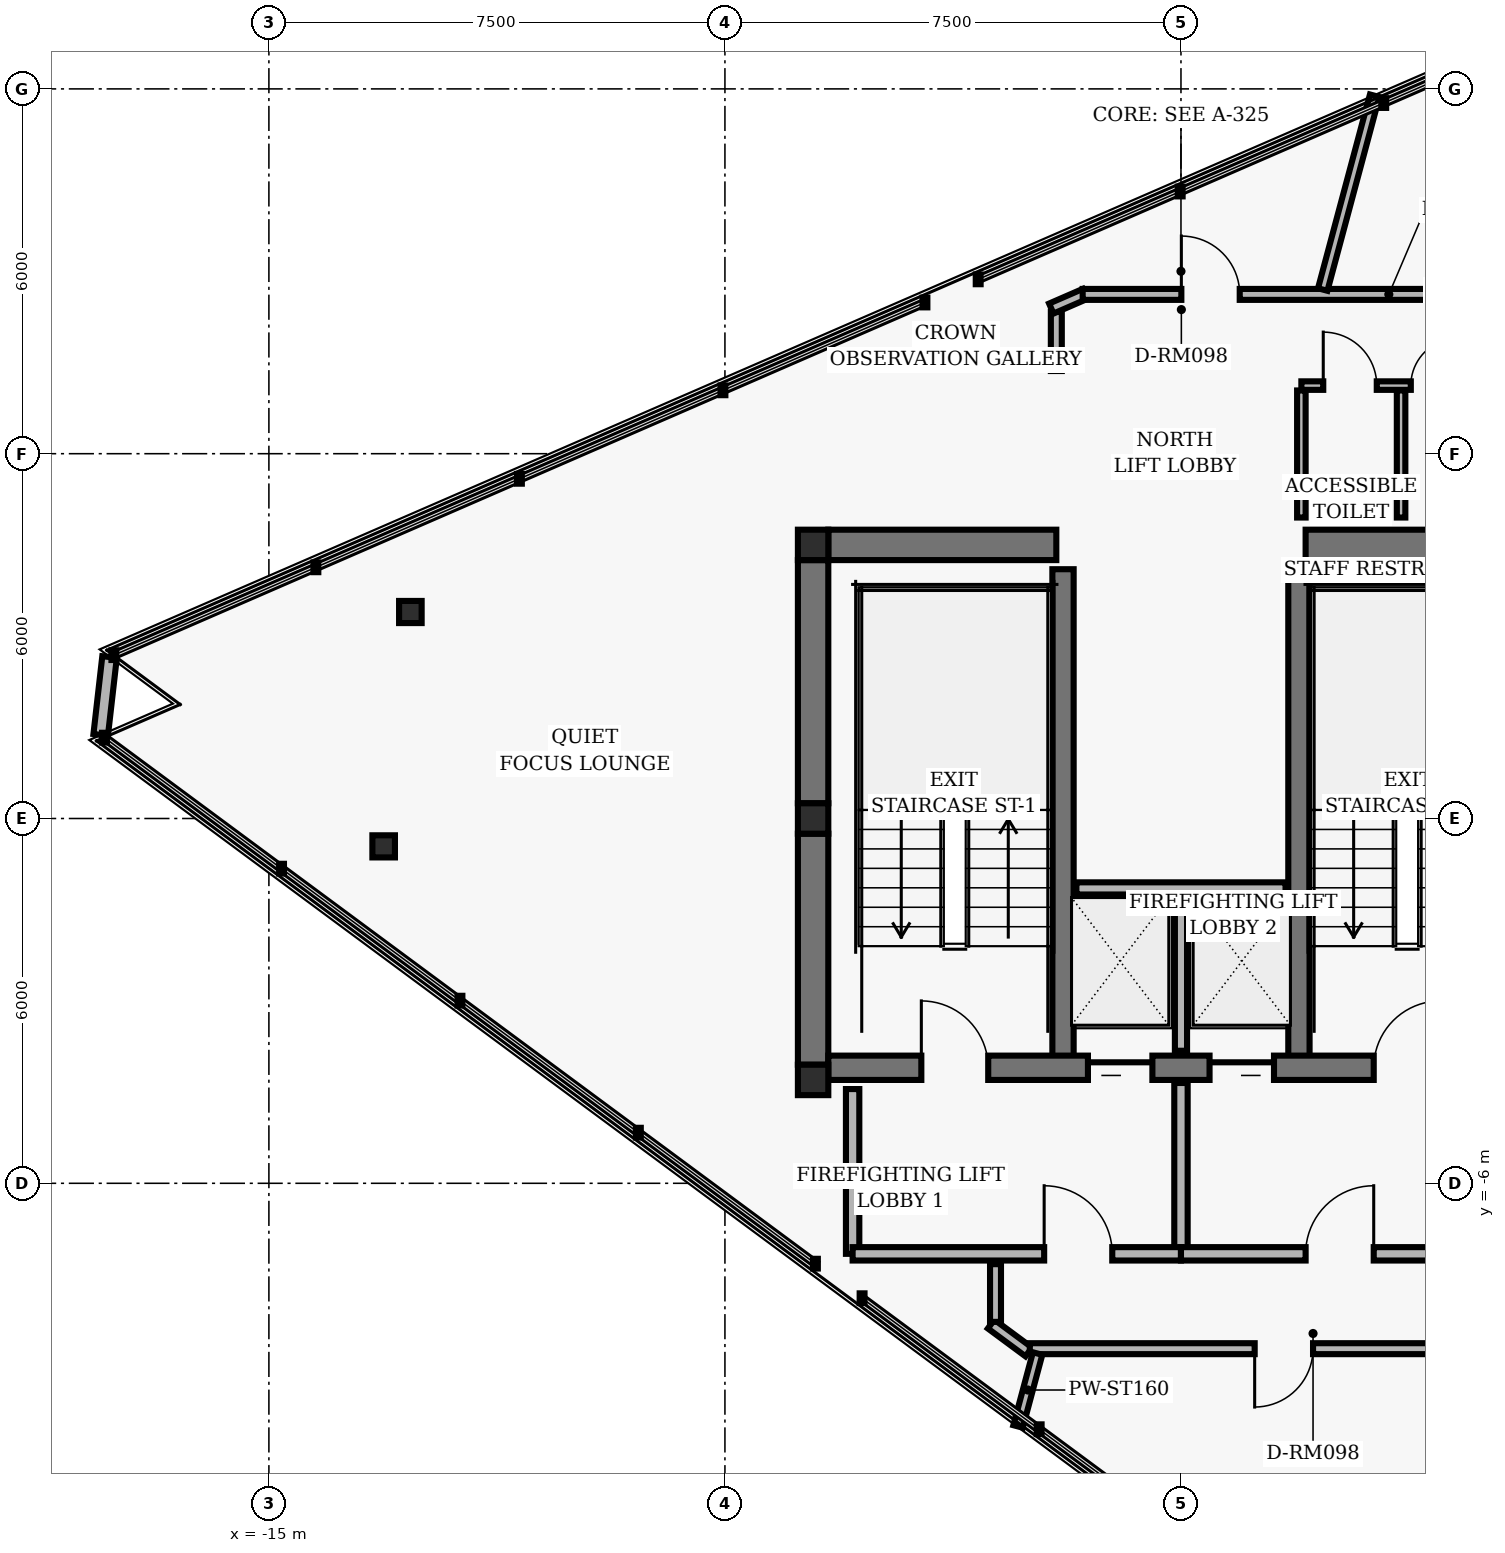
"""IFC4 building model, lengths in metres.
Left out: names, types, materials, properties, quantities, classifications, styles, units other than length and angle.
Written with IfcOpenShell. Run it as: python <this file> out.ifc"""

import sys

from ifc_helpers import new_model, si_unit, direction, frame, frame_2d, origin, origin_2d, place, context, subcontext, project, spatial, rectangle, hollow_rectangle, i_section, extrude, element, fill, save


model = new_model("IFC4")
c1 = context("Model", 3, precision=1e-05, world=origin(), true_north=direction((0.0, 1.0)))
c2 = subcontext(c1, "Body", "Model", "MODEL_VIEW")
j1 = project(units=[si_unit("LENGTHUNIT", "METRE"), si_unit("PLANEANGLEUNIT", "RADIAN")], contexts=[c1])
p1 = place(None, origin())
s1 = spatial("IfcSite", under=j1, at=p1, CompositionType="ELEMENT")
p2 = place(p1, origin())
s2 = spatial("IfcBuilding", under=s1, at=p2, CompositionType="ELEMENT")
p3 = place(p2, frame((0.0, 0.0, 243.36)))
s3 = spatial("IfcBuildingStorey", under=s2, at=p3, CompositionType="ELEMENT", Elevation=243.36)
for number, where, z_axis, x_axis in (
    (1, (-6.05, 4.5, 0.0), (0.0, 0.0, 1.0), (1.0, 0.0, 0.0)),
    (2, (-6.05, 0.0, 0.0), (0.0, 0.0, 1.0), (1.0, 0.0, 0.0)),
    (3, (-6.05, -4.3, 0.0), (0.0, 0.0, 1.0), (1.0, 0.0, 0.0)),
):
    element("IfcColumn", number, at=place(p3, frame(where, z_axis=z_axis, x_axis=x_axis)), inside=s3, PredefinedType="COLUMN", context=c2, shape_type="SweptSolid", body=[
        extrude(hollow_rectangle(XDim=0.5, YDim=0.5, WallThickness=0.02, InnerFilletRadius=0.02, OuterFilletRadius=0.04, at=origin_2d()), origin(), (0.0, 0.0, 1.0), 2.88),
    ])
p4 = place(p3, frame((-6.05, 0.25, 0.0), z_axis=(0.0, 0.0, 1.0), x_axis=(0.0, 1.0, 0.0)))
e4 = element("IfcWall", 4, at=p4, inside=s3, PredefinedType="SHEAR", context=c2, shape_type="SweptSolid", body=[
    extrude(rectangle(XDim=4.0, YDim=0.5, at=frame_2d((2.0, 0.0))), origin(), (0.0, 0.0, 1.0), 2.648),
])
p5 = place(p3, frame((-6.05, -4.05, 0.0), z_axis=(0.0, 0.0, 1.0), x_axis=(0.0, 1.0, 0.0)))
e5 = element("IfcWall", 5, at=p5, inside=s3, PredefinedType="SHEAR", context=c2, shape_type="SweptSolid", body=[
    extrude(rectangle(XDim=3.8, YDim=0.5, at=frame_2d((1.9, 0.0))), origin(), (0.0, 0.0, 1.0), 2.648),
])
for number, where, z_axis, x_axis in (
    (6, (-1.94, -4.1, 0.0), (0.0, 0.0, 1.0), (0.0, 1.0, 0.0)),
    (7, (1.94, -4.1, 0.0), (0.0, 0.0, 1.0), (0.0, 1.0, 0.0)),
):
    element("IfcWall", number, at=place(p3, frame(where, z_axis=z_axis, x_axis=x_axis)), inside=s3, PredefinedType="SHEAR", context=c2, shape_type="SweptSolid", body=[
        extrude(rectangle(XDim=8.2, YDim=0.35, at=frame_2d((4.1, 0.0))), origin(), (0.0, 0.0, 1.0), 2.648),
    ])
p6 = place(p3, frame((-5.8, -4.1, 0.0), z_axis=(0.0, 0.0, 1.0), x_axis=(1.0, 0.0, 0.0)))
e8 = element("IfcWall", 8, at=p6, inside=s3, PredefinedType="SHEAR", context=c2, shape_type="SweptSolid", body=[
    extrude(rectangle(XDim=11.6, YDim=0.4, at=frame_2d((5.8, 0.0))), origin(), (0.0, 0.0, 1.0), 2.648),
])
p7 = place(p6, frame((1.53, 0.0, 0.0)))
e9 = element("IfcOpeningElement", 9, at=p7, cuts=e8, PredefinedType="OPENING", context=c2, shape_type="SweptSolid", body=[
    extrude(rectangle(XDim=1.1, YDim=2.04, at=frame_2d((0.55, 1.02))), frame((0.0, 0.21, 0.0), z_axis=(0.0, -1.0, 0.0), x_axis=(1.0, 0.0, 0.0)), (0.0, 0.0, 1.0), 0.42),
])
p8 = place(p6, frame((8.97, 0.0, 0.0)))
e10 = element("IfcOpeningElement", 10, at=p8, cuts=e8, PredefinedType="OPENING", context=c2, shape_type="SweptSolid", body=[
    extrude(rectangle(XDim=1.1, YDim=2.04, at=frame_2d((0.55, 1.02))), frame((0.0, 0.21, 0.0), z_axis=(0.0, -1.0, 0.0), x_axis=(1.0, 0.0, 0.0)), (0.0, 0.0, 1.0), 0.42),
])
p9 = place(p6, frame((4.27, 0.0, 0.0)))
e11 = element("IfcOpeningElement", 11, at=p9, cuts=e8, PredefinedType="OPENING", context=c2, shape_type="SweptSolid", body=[
    extrude(rectangle(XDim=1.06, YDim=2.04, at=frame_2d((0.53, 1.02))), frame((0.0, 0.21, 0.0), z_axis=(0.0, -1.0, 0.0), x_axis=(1.0, 0.0, 0.0)), (0.0, 0.0, 1.0), 0.42),
])
p10 = place(p6, frame((6.27, 0.0, 0.0)))
e12 = element("IfcOpeningElement", 12, at=p10, cuts=e8, PredefinedType="OPENING", context=c2, shape_type="SweptSolid", body=[
    extrude(rectangle(XDim=1.06, YDim=2.04, at=frame_2d((0.53, 1.02))), frame((0.0, 0.21, 0.0), z_axis=(0.0, -1.0, 0.0), x_axis=(1.0, 0.0, 0.0)), (0.0, 0.0, 1.0), 0.42),
])
for number, where, z_axis, x_axis in (
    (13, (-5.8, 4.5, 0.0), (0.0, 0.0, 1.0), (1.0, 0.0, 0.0)),
    (14, (2.05, 4.5, 0.0), (0.0, 0.0, 1.0), (1.0, 0.0, 0.0)),
):
    element("IfcWall", number, at=place(p3, frame(where, z_axis=z_axis, x_axis=x_axis)), inside=s3, PredefinedType="SHEAR", context=c2, shape_type="SweptSolid", body=[
        extrude(rectangle(XDim=3.75, YDim=0.5, at=frame_2d((1.875, 0.0))), origin(), (0.0, 0.0, 1.0), 2.648),
    ])
for number, where, z_axis, x_axis in (
    (15, (-12.673, 3.396, 0.0), (0.0, 0.0, 1.0), (1.0, 0.0, 0.0)),
    (16, (-13.113, -0.458, 0.0), (0.0, 0.0, 1.0), (1.0, 0.0, 0.0)),
):
    element("IfcColumn", number, at=place(p3, frame(where, z_axis=z_axis, x_axis=x_axis)), inside=s3, PredefinedType="COLUMN", context=c2, shape_type="SweptSolid", body=[
        extrude(i_section(OverallWidth=0.371, OverallDepth=0.364, WebThickness=0.013, FlangeThickness=0.022, FilletRadius=0.015, at=origin_2d()), origin(), (0.0, 0.0, 1.0), 2.88),
    ])
p11 = place(p3, frame((-17.621, 2.656, 0.0), z_axis=(0.0, 0.0, 1.0), x_axis=(-0.11313504355, -0.993579620323, 0.0)))
e17 = element("IfcWall", 17, at=p11, inside=s3, PredefinedType="PARAPET", context=c2, shape_type="SweptSolid", body=[
    extrude(rectangle(XDim=1.288, YDim=0.24, at=frame_2d((0.644, 0.0))), origin(), (0.0, 0.0, 1.0), 2.168),
])
p12 = place(p3, frame((0.0, -3.82, 0.0), z_axis=(0.0, 0.0, 1.0), x_axis=(0.0, 1.0, 0.0)))
e18 = element("IfcWall", 18, at=p12, inside=s3, PredefinedType="PARTITIONING", context=c2, shape_type="SweptSolid", body=[
    extrude(rectangle(XDim=2.67, YDim=0.2, at=frame_2d((1.335, 0.0))), origin(), (0.0, 0.0, 1.0), 2.623),
])
p13 = place(p3, frame((-1.72, -1.15, 0.0), z_axis=(0.0, 0.0, 1.0), x_axis=(1.0, 0.0, 0.0)))
e19 = element("IfcWall", 19, at=p13, inside=s3, PredefinedType="PARTITIONING", context=c2, shape_type="SweptSolid", body=[
    extrude(rectangle(XDim=3.44, YDim=0.2, at=frame_2d((1.72, 0.0))), origin(), (0.0, 0.0, 1.0), 2.623),
])
p14 = place(p3, frame((-5.4, -7.16, 0.0), z_axis=(0.0, 0.0, 1.0), x_axis=(0.0, 1.0, 0.0)))
e20 = element("IfcWall", 20, at=p14, inside=s3, PredefinedType="PARTITIONING", context=c2, shape_type="SweptSolid", body=[
    extrude(rectangle(XDim=2.71, YDim=0.22, at=frame_2d((1.355, 0.0))), origin(), (0.0, 0.0, 1.0), 2.623),
])
p15 = place(p3, frame((0.0, -7.16, 0.0), z_axis=(0.0, 0.0, 1.0), x_axis=(0.0, 1.0, 0.0)))
e21 = element("IfcWall", 21, at=p15, inside=s3, PredefinedType="PARTITIONING", context=c2, shape_type="SweptSolid", body=[
    extrude(rectangle(XDim=2.81, YDim=0.22, at=frame_2d((1.405, 0.0))), origin(), (0.0, 0.0, 1.0), 2.623),
])
p16 = place(p3, frame((-5.4, -7.16, 0.0), z_axis=(0.0, 0.0, 1.0), x_axis=(1.0, 0.0, 0.0)))
e22 = element("IfcWall", 22, at=p16, inside=s3, PredefinedType="PARTITIONING", context=c2, shape_type="SweptSolid", body=[
    extrude(rectangle(XDim=5.4, YDim=0.22, at=frame_2d((2.7, 0.0))), origin(), (0.0, 0.0, 1.0), 2.623),
])
p17 = place(p16, frame((3.15, 0.0, 0.0)))
e23 = element("IfcOpeningElement", 23, at=p17, cuts=e22, PredefinedType="OPENING", context=c2, shape_type="SweptSolid", body=[
    extrude(rectangle(XDim=1.12, YDim=2.02, at=frame_2d((0.56, 1.01))), frame((0.0, 0.12, 0.0), z_axis=(0.0, -1.0, 0.0), x_axis=(1.0, 0.0, 0.0)), (0.0, 0.0, 1.0), 0.24),
])
p18 = place(p3, frame((0.0, -7.16, 0.0), z_axis=(0.0, 0.0, 1.0), x_axis=(1.0, 0.0, 0.0)))
e24 = element("IfcWall", 24, at=p18, inside=s3, PredefinedType="PARTITIONING", context=c2, shape_type="SweptSolid", body=[
    extrude(rectangle(XDim=4.95, YDim=0.22, at=frame_2d((2.475, 0.0))), origin(), (0.0, 0.0, 1.0), 2.623),
])
p19 = place(p18, frame((2.05, 0.0, 0.0)))
e25 = element("IfcOpeningElement", 25, at=p19, cuts=e24, PredefinedType="OPENING", context=c2, shape_type="SweptSolid", body=[
    extrude(rectangle(XDim=1.12, YDim=2.02, at=frame_2d((0.56, 1.01))), frame((0.0, 0.12, 0.0), z_axis=(0.0, -1.0, 0.0), x_axis=(1.0, 0.0, 0.0)), (0.0, 0.0, 1.0), 0.24),
])
p20 = place(p3, frame((1.98, 4.95, 0.0), z_axis=(0.0, 0.0, 1.0), x_axis=(0.0, 1.0, 0.0)))
e26 = element("IfcWall", 26, at=p20, inside=s3, PredefinedType="PARTITIONING", context=c2, shape_type="SweptSolid", body=[
    extrude(rectangle(XDim=2.09, YDim=0.14, at=frame_2d((1.045, 0.0))), origin(), (0.0, 0.0, 1.0), 2.623),
])
p21 = place(p3, frame((1.98, 7.12, 0.0), z_axis=(0.0, 0.0, 1.0), x_axis=(1.0, 0.0, 0.0)))
e27 = element("IfcWall", 27, at=p21, inside=s3, PredefinedType="PARTITIONING", context=c2, shape_type="SweptSolid", body=[
    extrude(rectangle(XDim=3.86, YDim=0.14, at=frame_2d((1.93, 0.0))), origin(), (0.0, 0.0, 1.0), 2.623),
])
p22 = place(p21, frame((0.36, 0.0, 0.0)))
e28 = element("IfcOpeningElement", 28, at=p22, cuts=e27, PredefinedType="OPENING", context=c2, shape_type="SweptSolid", body=[
    extrude(rectangle(XDim=0.88, YDim=2.02, at=frame_2d((0.44, 1.01))), frame((0.0, 0.08, 0.0), z_axis=(0.0, -1.0, 0.0), x_axis=(1.0, 0.0, 0.0)), (0.0, 0.0, 1.0), 0.16),
])
p23 = place(p21, frame((1.8, 0.0, 0.0)))
e29 = element("IfcOpeningElement", 29, at=p23, cuts=e27, PredefinedType="OPENING", context=c2, shape_type="SweptSolid", body=[
    extrude(rectangle(XDim=0.78, YDim=2.01, at=frame_2d((0.39, 1.005))), frame((0.0, 0.08, 0.0), z_axis=(0.0, -1.0, 0.0), x_axis=(1.0, 0.0, 0.0)), (0.0, 0.0, 1.0), 0.16),
])
p24 = place(p21, frame((2.92, 0.0, 0.0)))
e30 = element("IfcOpeningElement", 30, at=p24, cuts=e27, PredefinedType="OPENING", context=c2, shape_type="SweptSolid", body=[
    extrude(rectangle(XDim=0.78, YDim=2.01, at=frame_2d((0.39, 1.005))), frame((0.0, 0.08, 0.0), z_axis=(0.0, -1.0, 0.0), x_axis=(1.0, 0.0, 0.0)), (0.0, 0.0, 1.0), 0.16),
])
p25 = place(p3, frame((3.62, 4.95, 0.0), z_axis=(0.0, 0.0, 1.0), x_axis=(0.0, 1.0, 0.0)))
e31 = element("IfcWall", 31, at=p25, inside=s3, PredefinedType="PARTITIONING", context=c2, shape_type="SweptSolid", body=[
    extrude(rectangle(XDim=2.09, YDim=0.14, at=frame_2d((1.045, 0.0))), origin(), (0.0, 0.0, 1.0), 2.623),
])
p26 = place(p3, frame((-2.503, -8.773, 0.0), z_axis=(0.0, 0.0, 1.0), x_axis=(-0.803978362095, 0.594658551845, 0.0)))
e32 = element("IfcWall", 32, at=p26, inside=s3, PredefinedType="PARTITIONING", context=c2, shape_type="SweptSolid", body=[
    extrude(rectangle(XDim=0.77, YDim=0.18, at=frame_2d((0.385, 0.0))), origin(), (0.0, 0.0, 1.0), 2.203),
])
p27 = place(p3, frame((-3.05, -8.279, 0.0), z_axis=(0.0, 0.0, 1.0), x_axis=(0.0, 1.0, 0.0)))
e33 = element("IfcWall", 33, at=p27, inside=s3, PredefinedType="PARTITIONING", context=c2, shape_type="SweptSolid", body=[
    extrude(rectangle(XDim=0.949, YDim=0.18, at=frame_2d((0.475, 0.0))), origin(), (0.0, 0.0, 1.0), 2.623),
])
p28 = place(p3, frame((-2.05, 7.36, 0.0), z_axis=(0.0, 0.0, 1.0), x_axis=(0.0, 1.0, 0.0)))
e34 = element("IfcWall", 34, at=p28, inside=s3, PredefinedType="PARTITIONING", context=c2, shape_type="SweptSolid", body=[
    extrude(rectangle(XDim=0.973, YDim=0.18, at=frame_2d((0.486, 0.0))), origin(), (0.0, 0.0, 1.0), 2.623),
])
p29 = place(p3, frame((-2.133, 8.387, 0.0), z_axis=(0.0, 0.0, 1.0), x_axis=(0.917063633355, 0.398740883754, 0.0)))
e35 = element("IfcWall", 35, at=p29, inside=s3, PredefinedType="PARTITIONING", context=c2, shape_type="SweptSolid", body=[
    extrude(rectangle(XDim=0.604, YDim=0.18, at=frame_2d((0.302, 0.0))), origin(), (0.0, 0.0, 1.0), 2.203),
])
p30 = place(p3, frame((-1.617, 8.62, 0.0), z_axis=(0.0, 0.0, 1.0), x_axis=(1.0, 0.0, 0.0)))
e36 = element("IfcWall", 36, at=p30, inside=s3, PredefinedType="PARTITIONING", context=c2, shape_type="SweptSolid", body=[
    extrude(rectangle(XDim=7.487, YDim=0.18, at=frame_2d((3.743, 0.0))), origin(), (0.0, 0.0, 1.0), 2.623),
])
p31 = place(p30, frame((1.623, 0.0, 0.0)))
e37 = element("IfcOpeningElement", 37, at=p31, cuts=e36, PredefinedType="OPENING", context=c2, shape_type="SweptSolid", body=[
    extrude(rectangle(XDim=0.96, YDim=2.02, at=frame_2d((0.48, 1.01))), frame((0.0, 0.1, 0.0), z_axis=(0.0, -1.0, 0.0), x_axis=(1.0, 0.0, 0.0)), (0.0, 0.0, 1.0), 0.2),
])
p32 = place(p3, frame((5.87, -8.72, 0.0), z_axis=(0.0, 0.0, 1.0), x_axis=(-1.0, 0.0, 0.0)))
e38 = element("IfcWall", 38, at=p32, inside=s3, PredefinedType="PARTITIONING", context=c2, shape_type="SweptSolid", body=[
    extrude(rectangle(XDim=8.356, YDim=0.18, at=frame_2d((4.178, 0.0))), origin(), (0.0, 0.0, 1.0), 2.623),
])
p33 = place(p32, frame((3.698, 0.0, 0.0)))
e39 = element("IfcOpeningElement", 39, at=p33, cuts=e38, PredefinedType="OPENING", context=c2, shape_type="SweptSolid", body=[
    extrude(rectangle(XDim=0.96, YDim=2.02, at=frame_2d((0.48, 1.01))), frame((0.0, 0.1, 0.0), z_axis=(0.0, -1.0, 0.0), x_axis=(1.0, 0.0, 0.0)), (0.0, 0.0, 1.0), 0.2),
])
p34 = place(p3, frame((-2.358, -8.8, 0.0), z_axis=(0.0, 0.0, 1.0), x_axis=(-0.258739361089, -0.965947174034, 0.0)))
e40 = element("IfcWall", 40, at=p34, inside=s3, PredefinedType="PARTITIONING", context=c2, shape_type="SweptSolid", body=[
    extrude(rectangle(XDim=1.242, YDim=0.16, at=frame_2d((0.621, 0.0))), origin(), (0.0, 0.0, 1.0), 2.623),
])
p35 = place(p3, frame((2.331, 8.7, 0.0), z_axis=(0.0, 0.0, 1.0), x_axis=(0.258776761059, 0.965937155273, 0.0)))
e41 = element("IfcWall", 41, at=p35, inside=s3, PredefinedType="PARTITIONING", context=c2, shape_type="SweptSolid", body=[
    extrude(rectangle(XDim=3.3, YDim=0.16, at=frame_2d((1.65, 0.0))), origin(), (0.0, 0.0, 1.0), 2.623),
])
p36 = place(p7, origin())
e42 = element("IfcDoor", 42, at=p36, inside=s3, OperationType="SINGLE_SWING_LEFT", PredefinedType="DOOR", context=c2, shape_type="SweptSolid", body=[
    extrude(rectangle(XDim=1.1, YDim=2.04, at=frame_2d((0.55, 1.02))), frame((0.0, 0.025, 0.0), z_axis=(0.0, -1.0, 0.0), x_axis=(1.0, 0.0, 0.0)), (0.0, 0.0, 1.0), 0.05),
])
fill(e9, e42)
p37 = place(p8, origin())
e43 = element("IfcDoor", 43, at=p37, inside=s3, OperationType="SINGLE_SWING_RIGHT", PredefinedType="DOOR", context=c2, shape_type="SweptSolid", body=[
    extrude(rectangle(XDim=1.1, YDim=2.04, at=frame_2d((0.55, 1.02))), frame((0.0, 0.025, 0.0), z_axis=(0.0, -1.0, 0.0), x_axis=(1.0, 0.0, 0.0)), (0.0, 0.0, 1.0), 0.05),
])
fill(e10, e43)
p38 = place(p9, origin())
e44 = element("IfcDoor", 44, at=p38, inside=s3, OperationType="SLIDING_TO_LEFT", PredefinedType="DOOR", context=c2, shape_type="SweptSolid", body=[
    extrude(rectangle(XDim=1.06, YDim=2.04, at=frame_2d((0.53, 1.02))), frame((0.0, 0.025, 0.0), z_axis=(0.0, -1.0, 0.0), x_axis=(1.0, 0.0, 0.0)), (0.0, 0.0, 1.0), 0.05),
])
fill(e11, e44)
p39 = place(p10, origin())
e45 = element("IfcDoor", 45, at=p39, inside=s3, OperationType="SLIDING_TO_RIGHT", PredefinedType="DOOR", context=c2, shape_type="SweptSolid", body=[
    extrude(rectangle(XDim=1.06, YDim=2.04, at=frame_2d((0.53, 1.02))), frame((0.0, 0.025, 0.0), z_axis=(0.0, -1.0, 0.0), x_axis=(1.0, 0.0, 0.0)), (0.0, 0.0, 1.0), 0.05),
])
fill(e12, e45)
p40 = place(p17, origin())
e46 = element("IfcDoor", 46, at=p40, inside=s3, OperationType="SINGLE_SWING_LEFT", PredefinedType="DOOR", context=c2, shape_type="SweptSolid", body=[
    extrude(rectangle(XDim=1.12, YDim=2.02, at=frame_2d((0.56, 1.01))), frame((0.0, 0.025, 0.0), z_axis=(0.0, -1.0, 0.0), x_axis=(1.0, 0.0, 0.0)), (0.0, 0.0, 1.0), 0.05),
])
fill(e23, e46)
p41 = place(p19, origin())
e47 = element("IfcDoor", 47, at=p41, inside=s3, OperationType="SINGLE_SWING_RIGHT", PredefinedType="DOOR", context=c2, shape_type="SweptSolid", body=[
    extrude(rectangle(XDim=1.12, YDim=2.02, at=frame_2d((0.56, 1.01))), frame((0.0, 0.025, 0.0), z_axis=(0.0, -1.0, 0.0), x_axis=(1.0, 0.0, 0.0)), (0.0, 0.0, 1.0), 0.05),
])
fill(e25, e47)
p42 = place(p22, origin())
e48 = element("IfcDoor", 48, at=p42, inside=s3, OperationType="SINGLE_SWING_LEFT", PredefinedType="DOOR", context=c2, shape_type="SweptSolid", body=[
    extrude(rectangle(XDim=0.88, YDim=2.02, at=frame_2d((0.44, 1.01))), frame((0.0, 0.025, 0.0), z_axis=(0.0, -1.0, 0.0), x_axis=(1.0, 0.0, 0.0)), (0.0, 0.0, 1.0), 0.05),
])
fill(e28, e48)
p43 = place(p23, origin())
e49 = element("IfcDoor", 49, at=p43, inside=s3, OperationType="SINGLE_SWING_RIGHT", PredefinedType="DOOR", context=c2, shape_type="SweptSolid", body=[
    extrude(rectangle(XDim=0.78, YDim=2.01, at=frame_2d((0.39, 1.005))), frame((0.0, 0.025, 0.0), z_axis=(0.0, -1.0, 0.0), x_axis=(1.0, 0.0, 0.0)), (0.0, 0.0, 1.0), 0.05),
])
fill(e29, e49)
p44 = place(p33, origin())
e50 = element("IfcDoor", 50, at=p44, inside=s3, OperationType="SINGLE_SWING_RIGHT", PredefinedType="DOOR", context=c2, shape_type="SweptSolid", body=[
    extrude(rectangle(XDim=0.96, YDim=2.02, at=frame_2d((0.48, 1.01))), frame((0.0, 0.025, 0.0), z_axis=(0.0, -1.0, 0.0), x_axis=(1.0, 0.0, 0.0)), (0.0, 0.0, 1.0), 0.05),
])
fill(e39, e50)
p45 = place(p31, origin())
e51 = element("IfcDoor", 51, at=p45, inside=s3, OperationType="SINGLE_SWING_LEFT", PredefinedType="DOOR", context=c2, shape_type="SweptSolid", body=[
    extrude(rectangle(XDim=0.96, YDim=2.02, at=frame_2d((0.48, 1.01))), frame((0.0, 0.025, 0.0), z_axis=(0.0, -1.0, 0.0), x_axis=(1.0, 0.0, 0.0)), (0.0, 0.0, 1.0), 0.05),
])
fill(e37, e51)
save(model, sys.argv[1])
